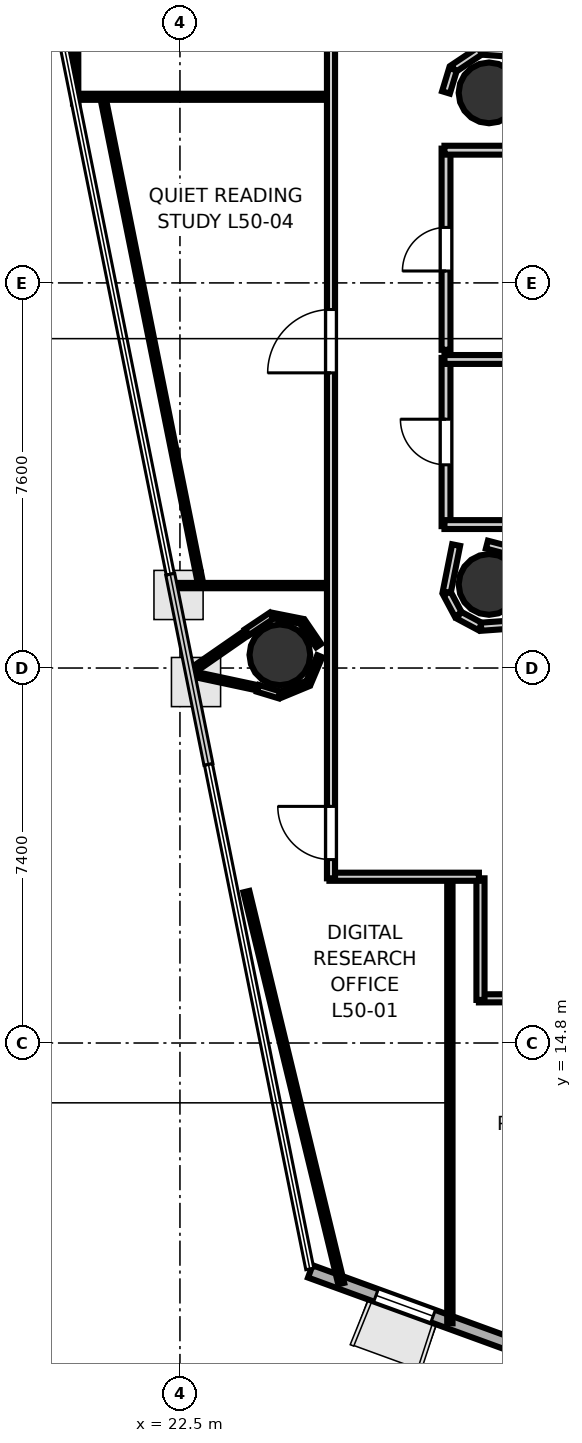
"""IFC4 building model, lengths in metres.
Left out: names, types, materials, properties, quantities, classifications, styles, units other than length and angle.
Written with IfcOpenShell. Run it as: python <this file> out.ifc"""

import sys

from ifc_helpers import new_model, si_unit, direction, frame, frame_2d, origin, origin_2d, place, context, subcontext, project, spatial, rectangle, hollow_circle, extrude, element, fill, save


model = new_model("IFC4")
c1 = context("Model", 3, precision=1e-05, world=origin(), true_north=direction((0.0, 1.0)))
c2 = subcontext(c1, "Body", "Model", "MODEL_VIEW")
j1 = project(units=[si_unit("LENGTHUNIT", "METRE"), si_unit("PLANEANGLEUNIT", "RADIAN")], contexts=[c1])
p1 = place(None, origin())
s1 = spatial("IfcSite", under=j1, at=p1, CompositionType="ELEMENT")
p2 = place(p1, origin())
s2 = spatial("IfcBuilding", under=s1, at=p2, CompositionType="ELEMENT")
p3 = place(p2, frame((0.0, 0.0, 196.6)))
s3 = spatial("IfcBuildingStorey", under=s2, at=p3, CompositionType="ELEMENT", Elevation=196.6)
for number, where, z_axis, x_axis in (
    (1, (28.6, 33.55, 0.0), (0.0, 0.0, 1.0), (1.0, 0.0, 0.0)),
    (2, (28.6, 23.85, 0.0), (0.0, 0.0, 1.0), (1.0, 0.0, 0.0)),
    (3, (24.472, 22.46, 0.0), (0.0, 0.0, 1.0), (1.0, 0.0, 0.0)),
):
    element("IfcColumn", number, at=place(p3, frame(where, z_axis=z_axis, x_axis=x_axis)), inside=s3, PredefinedType="COLUMN", context=c2, shape_type="SweptSolid", body=[
        extrude(hollow_circle(Radius=0.6, WallThickness=0.03, at=origin_2d()), origin(), (0.0, 0.0, 1.0), 3.7),
    ])
p4 = place(p3, frame((25.072, 10.293, 0.0), z_axis=(0.0, 0.0, 1.0), x_axis=(0.939543106306, -0.342430651948, 0.0)))
e4 = element("IfcWall", 4, at=p4, inside=s3, PredefinedType="SOLIDWALL", context=c2, shape_type="SweptSolid", body=[
    extrude(rectangle(XDim=7.668, YDim=0.26, at=frame_2d((3.834, 0.0))), origin(), (0.0, 0.0, 1.0), 3.52),
])
p5 = place(p4, frame((1.38, 0.0, 0.9)))
e5 = element("IfcOpeningElement", 5, at=p5, cuts=e4, PredefinedType="OPENING", context=c2, shape_type="SweptSolid", body=[
    extrude(rectangle(XDim=1.2, YDim=2.0, at=frame_2d((0.6, 1.0))), frame((0.0, 0.14, 0.0), z_axis=(0.0, -1.0, 0.0), x_axis=(1.0, 0.0, 0.0)), (0.0, 0.0, 1.0), 0.28),
])
p6 = place(p4, frame((4.768, 0.0, 0.9)))
e6 = element("IfcOpeningElement", 6, at=p6, cuts=e4, PredefinedType="OPENING", context=c2, shape_type="SweptSolid", body=[
    extrude(rectangle(XDim=1.2, YDim=2.0, at=frame_2d((0.6, 1.0))), frame((0.0, 0.14, 0.0), z_axis=(0.0, -1.0, 0.0), x_axis=(1.0, 0.0, 0.0)), (0.0, 0.0, 1.0), 0.28),
])
p7 = place(p3, frame((27.751, 25.0, 0.0), z_axis=(0.0, 0.0, 1.0), x_axis=(0.0, 1.0, 0.0)))
e7 = element("IfcWall", 7, at=p7, inside=s3, PredefinedType="PLUMBINGWALL", context=c2, shape_type="SweptSolid", body=[
    extrude(rectangle(XDim=3.32, YDim=0.175, at=frame_2d((1.66, 0.0))), origin(), (0.0, 0.0, 1.0), 2.84),
])
p8 = place(p7, frame((1.21, 0.0, 0.0)))
e8 = element("IfcOpeningElement", 8, at=p8, cuts=e7, PredefinedType="OPENING", context=c2, shape_type="SweptSolid", body=[
    extrude(rectangle(XDim=0.9, YDim=2.1, at=frame_2d((0.45, 1.05))), frame((0.0, 0.097, 0.0), z_axis=(0.0, -1.0, 0.0), x_axis=(1.0, 0.0, 0.0)), (0.0, 0.0, 1.0), 0.195),
])
for number, where, z_axis, x_axis in (
    (9, (27.72, 28.289, 0.0), (0.0, 0.0, 1.0), (1.0, 0.0, 0.0)),
    (10, (29.22, 25.031, 0.0), (0.0, 0.0, 1.0), (-1.0, 0.0, 0.0)),
):
    element("IfcWall", number, at=place(p3, frame(where, z_axis=z_axis, x_axis=x_axis)), inside=s3, PredefinedType="PLUMBINGWALL", context=c2, shape_type="SweptSolid", body=[
        extrude(rectangle(XDim=1.5, YDim=0.175, at=frame_2d((0.75, 0.0))), origin(), (0.0, 0.0, 1.0), 2.84),
    ])
p9 = place(p3, frame((27.751, 28.48, 0.0), z_axis=(0.0, 0.0, 1.0), x_axis=(0.0, 1.0, 0.0)))
e11 = element("IfcWall", 11, at=p9, inside=s3, PredefinedType="PLUMBINGWALL", context=c2, shape_type="SweptSolid", body=[
    extrude(rectangle(XDim=3.97, YDim=0.175, at=frame_2d((1.985, 0.0))), origin(), (0.0, 0.0, 1.0), 2.84),
])
p10 = place(p9, frame((1.555, 0.0, 0.0)))
e12 = element("IfcOpeningElement", 12, at=p10, cuts=e11, PredefinedType="OPENING", context=c2, shape_type="SweptSolid", body=[
    extrude(rectangle(XDim=0.86, YDim=2.05, at=frame_2d((0.43, 1.025))), frame((0.0, 0.097, 0.0), z_axis=(0.0, -1.0, 0.0), x_axis=(1.0, 0.0, 0.0)), (0.0, 0.0, 1.0), 0.195),
])
p11 = place(p3, frame((27.72, 32.419, 0.0), z_axis=(0.0, 0.0, 1.0), x_axis=(1.0, 0.0, 0.0)))
e13 = element("IfcWall", 13, at=p11, inside=s3, PredefinedType="PLUMBINGWALL", context=c2, shape_type="SweptSolid", body=[
    extrude(rectangle(XDim=1.5, YDim=0.175, at=frame_2d((0.75, 0.0))), origin(), (0.0, 0.0, 1.0), 2.84),
])
p12 = place(p3, frame((29.03, 24.512, 0.0), z_axis=(0.0, 0.0, 1.0), x_axis=(-0.967681003213, 0.252177469296, 0.0)))
e14 = element("IfcWall", 14, at=p12, inside=s3, PredefinedType="PARTITIONING", context=c2, shape_type="SweptSolid", body=[
    extrude(rectangle(XDim=0.488, YDim=0.16, at=frame_2d((0.244, 0.0))), origin(), (0.0, 0.0, 1.0), 2.84),
])
p13 = place(p3, frame((29.64, 34.299, 0.0), z_axis=(0.0, 0.0, 1.0), x_axis=(-0.997392224386, 0.072171675429, 0.0)))
e15 = element("IfcWall", 15, at=p13, inside=s3, PredefinedType="PARTITIONING", context=c2, shape_type="SweptSolid", body=[
    extrude(rectangle(XDim=1.201, YDim=0.16, at=frame_2d((0.601, 0.0))), origin(), (0.0, 0.0, 1.0), 2.84),
])
p14 = place(p3, frame((28.423, 34.38, 0.0), z_axis=(0.0, 0.0, 1.0), x_axis=(-0.831571279003, -0.555418047903, 0.0)))
e16 = element("IfcWall", 16, at=p14, inside=s3, PredefinedType="PARTITIONING", context=c2, shape_type="SweptSolid", body=[
    extrude(rectangle(XDim=0.628, YDim=0.16, at=frame_2d((0.314, 0.0))), origin(), (0.0, 0.0, 1.0), 2.84),
])
p15 = place(p3, frame((27.888, 34.015, 0.0), z_axis=(0.0, 0.0, 1.0), x_axis=(-0.290263585829, -0.956946733492, 0.0)))
e17 = element("IfcWall", 17, at=p15, inside=s3, PredefinedType="PARTITIONING", context=c2, shape_type="SweptSolid", body=[
    extrude(rectangle(XDim=0.476, YDim=0.16, at=frame_2d((0.238, 0.0))), origin(), (0.0, 0.0, 1.0), 2.84),
])
p16 = place(p3, frame((27.95, 24.626, 0.0), z_axis=(0.0, 0.0, 1.0), x_axis=(-0.195125950178, -0.980778192848, 0.0)))
e18 = element("IfcWall", 18, at=p16, inside=s3, PredefinedType="PARTITIONING", context=c2, shape_type="SweptSolid", body=[
    extrude(rectangle(XDim=0.948, YDim=0.16, at=frame_2d((0.474, 0.0))), origin(), (0.0, 0.0, 1.0), 2.84),
])
for number, where, z_axis, x_axis in (
    (19, (27.768, 23.675, 0.0), (0.0, 0.0, 1.0), (0.472, -0.882, 0.0)),
    (20, (28.006, 23.243, 0.0), (0.0, 0.0, 1.0), (0.882, -0.472, 0.0)),
):
    element("IfcWall", number, at=place(p3, frame(where, z_axis=z_axis, x_axis=x_axis)), inside=s3, PredefinedType="PARTITIONING", context=c2, shape_type="SweptSolid", body=[
        extrude(rectangle(XDim=0.476, YDim=0.16, at=frame_2d((0.238, 0.0))), origin(), (0.0, 0.0, 1.0), 2.84),
    ])
p17 = place(p3, frame((28.442, 23.015, 0.0), z_axis=(0.0, 0.0, 1.0), x_axis=(0.99740683837, 0.07196942943, 0.0)))
e21 = element("IfcWall", 21, at=p17, inside=s3, PredefinedType="PARTITIONING", context=c2, shape_type="SweptSolid", body=[
    extrude(rectangle(XDim=1.201, YDim=0.16, at=frame_2d((0.601, 0.0))), origin(), (0.0, 0.0, 1.0), 2.84),
])
p18 = place(p3, frame((43.508, 15.727, 0.0), z_axis=(0.0, 0.0, 1.0), x_axis=(-0.999995335964, -0.003054185684, 0.0)))
e22 = element("IfcWall", 22, at=p18, inside=s3, PredefinedType="PARTITIONING", context=c2, shape_type="SweptSolid", body=[
    extrude(rectangle(XDim=15.108, YDim=0.16, at=frame_2d((7.554, 0.0))), origin(), (0.0, 0.0, 1.0), 2.84),
])
p19 = place(p18, frame((8.287, 0.0, 0.0)))
e23 = element("IfcOpeningElement", 23, at=p19, cuts=e22, PredefinedType="OPENING", context=c2, shape_type="SweptSolid", body=[
    extrude(rectangle(XDim=1.25, YDim=2.2, at=frame_2d((0.625, 1.1))), frame((0.0, 0.09, 0.0), z_axis=(0.0, -1.0, 0.0), x_axis=(1.0, 0.0, 0.0)), (0.0, 0.0, 1.0), 0.18),
])
p20 = place(p3, frame((28.431, 15.65, 0.0), z_axis=(0.0, 0.0, 1.0), x_axis=(0.0, 1.0, 0.0)))
e24 = element("IfcWall", 24, at=p20, inside=s3, PredefinedType="PARTITIONING", context=c2, shape_type="SweptSolid", body=[
    extrude(rectangle(XDim=2.4, YDim=0.16, at=frame_2d((1.2, 0.0))), origin(), (0.0, 0.0, 1.0), 2.84),
])
p21 = place(p3, frame((28.4, 18.081, 0.0), z_axis=(0.0, 0.0, 1.0), x_axis=(-1.0, 0.0, 0.0)))
e25 = element("IfcWall", 25, at=p21, inside=s3, PredefinedType="PARTITIONING", context=c2, shape_type="SweptSolid", body=[
    extrude(rectangle(XDim=2.95, YDim=0.16, at=frame_2d((1.475, 0.0))), origin(), (0.0, 0.0, 1.0), 2.84),
])
p22 = place(p3, frame((25.481, 18.05, 0.0), z_axis=(0.0, 0.0, 1.0), x_axis=(0.0, 1.0, 0.0)))
e26 = element("IfcWall", 26, at=p22, inside=s3, PredefinedType="PARTITIONING", context=c2, shape_type="SweptSolid", body=[
    extrude(rectangle(XDim=18.219, YDim=0.16, at=frame_2d((9.109, 0.0))), origin(), (0.0, 0.0, 1.0), 2.84),
])
p23 = place(p22, frame((0.369, 0.0, 0.0)))
e27 = element("IfcOpeningElement", 27, at=p23, cuts=e26, PredefinedType="OPENING", context=c2, shape_type="SweptSolid", body=[
    extrude(rectangle(XDim=1.05, YDim=2.15, at=frame_2d((0.525, 1.075))), frame((0.0, 0.09, 0.0), z_axis=(0.0, -1.0, 0.0), x_axis=(1.0, 0.0, 0.0)), (0.0, 0.0, 1.0), 0.18),
])
p24 = place(p22, frame((9.975, 0.0, 0.0)))
e28 = element("IfcOpeningElement", 28, at=p24, cuts=e26, PredefinedType="OPENING", context=c2, shape_type="SweptSolid", body=[
    extrude(rectangle(XDim=1.25, YDim=2.2, at=frame_2d((0.625, 1.1))), frame((0.0, 0.09, 0.0), z_axis=(0.0, -1.0, 0.0), x_axis=(1.0, 0.0, 0.0)), (0.0, 0.0, 1.0), 0.18),
])
p25 = place(p3, frame((25.238, 22.644, 0.0), z_axis=(0.0, 0.0, 1.0), x_axis=(-0.563363697458, 0.826209019792, 0.0)))
e29 = element("IfcWall", 29, at=p25, inside=s3, PredefinedType="PARTITIONING", context=c2, shape_type="SweptSolid", body=[
    extrude(rectangle(XDim=0.564, YDim=0.12, at=frame_2d((0.282, 0.0))), origin(), (0.0, 0.0, 1.0), 2.84),
])
p26 = place(p3, frame((24.9, 23.122, 0.0), z_axis=(0.0, 0.0, 1.0), x_axis=(-0.980773892286, 0.195147565217, 0.0)))
e30 = element("IfcWall", 30, at=p26, inside=s3, PredefinedType="PARTITIONING", context=c2, shape_type="SweptSolid", body=[
    extrude(rectangle(XDim=0.582, YDim=0.105, at=frame_2d((0.291, 0.0))), origin(), (0.0, 0.0, 1.0), 2.84),
])
p27 = place(p3, frame((24.306, 23.231, 0.0), z_axis=(0.0, 0.0, 1.0), x_axis=(-0.831274401047, -0.555862276256, 0.0)))
e31 = element("IfcWall", 31, at=p27, inside=s3, PredefinedType="PARTITIONING", context=c2, shape_type="SweptSolid", body=[
    extrude(rectangle(XDim=0.582, YDim=0.14, at=frame_2d((0.291, 0.0))), origin(), (0.0, 0.0, 1.0), 2.84),
])
p28 = place(p3, frame((23.81, 22.888, 0.0), z_axis=(0.0, 0.0, 1.0), x_axis=(-0.821958461882, -0.569547440466, 0.0)))
e32 = element("IfcWall", 32, at=p28, inside=s3, PredefinedType="PARTITIONING", context=c2, shape_type="SweptSolid", body=[
    extrude(rectangle(XDim=1.354, YDim=0.12, at=frame_2d((0.677, 0.0))), origin(), (0.0, 0.0, 1.0), 2.84),
])
p29 = place(p3, frame((22.701, 22.094, 0.0), z_axis=(0.0, 0.0, 1.0), x_axis=(0.977868408838, -0.209220876102, 0.0)))
e33 = element("IfcWall", 33, at=p29, inside=s3, PredefinedType="PARTITIONING", context=c2, shape_type="SweptSolid", body=[
    extrude(rectangle(XDim=1.353, YDim=0.105, at=frame_2d((0.676, 0.0))), origin(), (0.0, 0.0, 1.0), 2.84),
])
p30 = place(p3, frame((24.041, 21.798, 0.0), z_axis=(0.0, 0.0, 1.0), x_axis=(0.957015093463, -0.290038119708, 0.0)))
e34 = element("IfcWall", 34, at=p30, inside=s3, PredefinedType="PARTITIONING", context=c2, shape_type="SweptSolid", body=[
    extrude(rectangle(XDim=0.441, YDim=0.14, at=frame_2d((0.221, 0.0))), origin(), (0.0, 0.0, 1.0), 2.84),
])
p31 = place(p3, frame((24.484, 21.671, 0.0), z_axis=(0.0, 0.0, 1.0), x_axis=(0.923832639322, 0.382796622927, 0.0)))
e35 = element("IfcWall", 35, at=p31, inside=s3, PredefinedType="PARTITIONING", context=c2, shape_type="SweptSolid", body=[
    extrude(rectangle(XDim=0.582, YDim=0.12, at=frame_2d((0.291, 0.0))), origin(), (0.0, 0.0, 1.0), 2.84),
])
p32 = place(p3, frame((25.038, 21.91, 0.0), z_axis=(0.0, 0.0, 1.0), x_axis=(0.389093528864, 0.921198255424, 0.0)))
e36 = element("IfcWall", 36, at=p32, inside=s3, PredefinedType="PARTITIONING", context=c2, shape_type="SweptSolid", body=[
    extrude(rectangle(XDim=0.568, YDim=0.105, at=frame_2d((0.284, 0.0))), origin(), (0.0, 0.0, 1.0), 2.84),
])
p33 = place(p3, frame((27.827, 17.97, 0.0), z_axis=(0.0, 0.0, 1.0), x_axis=(0.0, -1.0, 0.0)))
e37 = element("IfcWall", 37, at=p33, inside=s3, PredefinedType="PARTITIONING", context=c2, shape_type="SweptSolid", body=[
    extrude(rectangle(XDim=8.701, YDim=0.105, at=frame_2d((4.351, 0.0))), origin(), (0.0, 0.0, 1.0), 2.84),
])
p34 = place(p3, frame((25.683, 10.052, 0.0), z_axis=(0.0, 0.0, 1.0), x_axis=(-0.235151316301, 0.971958774044, 0.0)))
e38 = element("IfcWall", 38, at=p34, inside=s3, PredefinedType="PARTITIONING", context=c2, shape_type="SweptSolid", body=[
    extrude(rectangle(XDim=7.958, YDim=0.12, at=frame_2d((3.979, 0.0))), origin(), (0.0, 0.0, 1.0), 2.84),
])
p35 = place(p3, frame((22.333, 23.827, 0.0), z_axis=(0.0, 0.0, 1.0), x_axis=(1.0, 0.0, 0.0)))
e39 = element("IfcWall", 39, at=p35, inside=s3, PredefinedType="PARTITIONING", context=c2, shape_type="SweptSolid", body=[
    extrude(rectangle(XDim=3.037, YDim=0.105, at=frame_2d((1.519, 0.0))), origin(), (0.0, 0.0, 1.0), 2.84),
])
p36 = place(p3, frame((25.37, 33.473, 0.0), z_axis=(0.0, 0.0, 1.0), x_axis=(-1.0, 0.0, 0.0)))
e40 = element("IfcWall", 40, at=p36, inside=s3, PredefinedType="PARTITIONING", context=c2, shape_type="SweptSolid", body=[
    extrude(rectangle(XDim=4.975, YDim=0.12, at=frame_2d((2.488, 0.0))), origin(), (0.0, 0.0, 1.0), 2.84),
])
p37 = place(p3, frame((20.442, 33.34, 0.0), z_axis=(0.0, 0.0, 1.0), x_axis=(-0.000608960305, 0.999999814584, 0.0)))
e41 = element("IfcWall", 41, at=p37, inside=s3, PredefinedType="PARTITIONING", context=c2, shape_type="SweptSolid", body=[
    extrude(rectangle(XDim=2.806, YDim=0.105, at=frame_2d((1.403, 0.0))), origin(), (0.0, 0.0, 1.0), 2.84),
])
p38 = place(p3, frame((22.891, 23.948, 0.0), z_axis=(0.0, 0.0, 1.0), x_axis=(-0.196981324141, 0.980407240865, 0.0)))
e42 = element("IfcWall", 42, at=p38, inside=s3, PredefinedType="PARTITIONING", context=c2, shape_type="SweptSolid", body=[
    extrude(rectangle(XDim=9.604, YDim=0.105, at=frame_2d((4.802, 0.0))), origin(), (0.0, 0.0, 1.0), 2.84),
])
p39 = place(p8, origin())
e43 = element("IfcDoor", 43, at=p39, inside=s3, OperationType="SINGLE_SWING_RIGHT", PredefinedType="DOOR", context=c2, shape_type="SweptSolid", body=[
    extrude(rectangle(XDim=0.9, YDim=2.1, at=frame_2d((0.45, 1.05))), frame((0.0, 0.025, 0.0), z_axis=(0.0, -1.0, 0.0), x_axis=(1.0, 0.0, 0.0)), (0.0, 0.0, 1.0), 0.05),
])
fill(e8, e43)
p40 = place(p10, origin())
e44 = element("IfcDoor", 44, at=p40, inside=s3, OperationType="SINGLE_SWING_LEFT", PredefinedType="DOOR", context=c2, shape_type="SweptSolid", body=[
    extrude(rectangle(XDim=0.86, YDim=2.05, at=frame_2d((0.43, 1.025))), frame((0.0, 0.025, 0.0), z_axis=(0.0, -1.0, 0.0), x_axis=(1.0, 0.0, 0.0)), (0.0, 0.0, 1.0), 0.05),
])
fill(e12, e44)
p41 = place(p23, origin())
e45 = element("IfcDoor", 45, at=p41, inside=s3, OperationType="SINGLE_SWING_RIGHT", PredefinedType="DOOR", context=c2, shape_type="SweptSolid", body=[
    extrude(rectangle(XDim=1.05, YDim=2.15, at=frame_2d((0.525, 1.075))), frame((0.0, 0.025, 0.0), z_axis=(0.0, -1.0, 0.0), x_axis=(1.0, 0.0, 0.0)), (0.0, 0.0, 1.0), 0.05),
])
fill(e27, e45)
p42 = place(p24, origin())
e46 = element("IfcDoor", 46, at=p42, inside=s3, OperationType="SINGLE_SWING_LEFT", PredefinedType="DOOR", context=c2, shape_type="SweptSolid", body=[
    extrude(rectangle(XDim=1.25, YDim=2.2, at=frame_2d((0.625, 1.1))), frame((0.0, 0.025, 0.0), z_axis=(0.0, -1.0, 0.0), x_axis=(1.0, 0.0, 0.0)), (0.0, 0.0, 1.0), 0.05),
])
fill(e28, e46)
p43 = place(p5, origin())
e47 = element("IfcWindow", 47, at=p43, inside=s3, PartitioningType="SINGLE_PANEL", PredefinedType="WINDOW", context=c2, shape_type="SweptSolid", body=[
    extrude(rectangle(XDim=1.2, YDim=2.0, at=frame_2d((0.6, 1.0))), frame((0.0, 0.03, 0.0), z_axis=(0.0, -1.0, 0.0), x_axis=(1.0, 0.0, 0.0)), (0.0, 0.0, 1.0), 0.06),
])
fill(e5, e47)
save(model, sys.argv[1])
